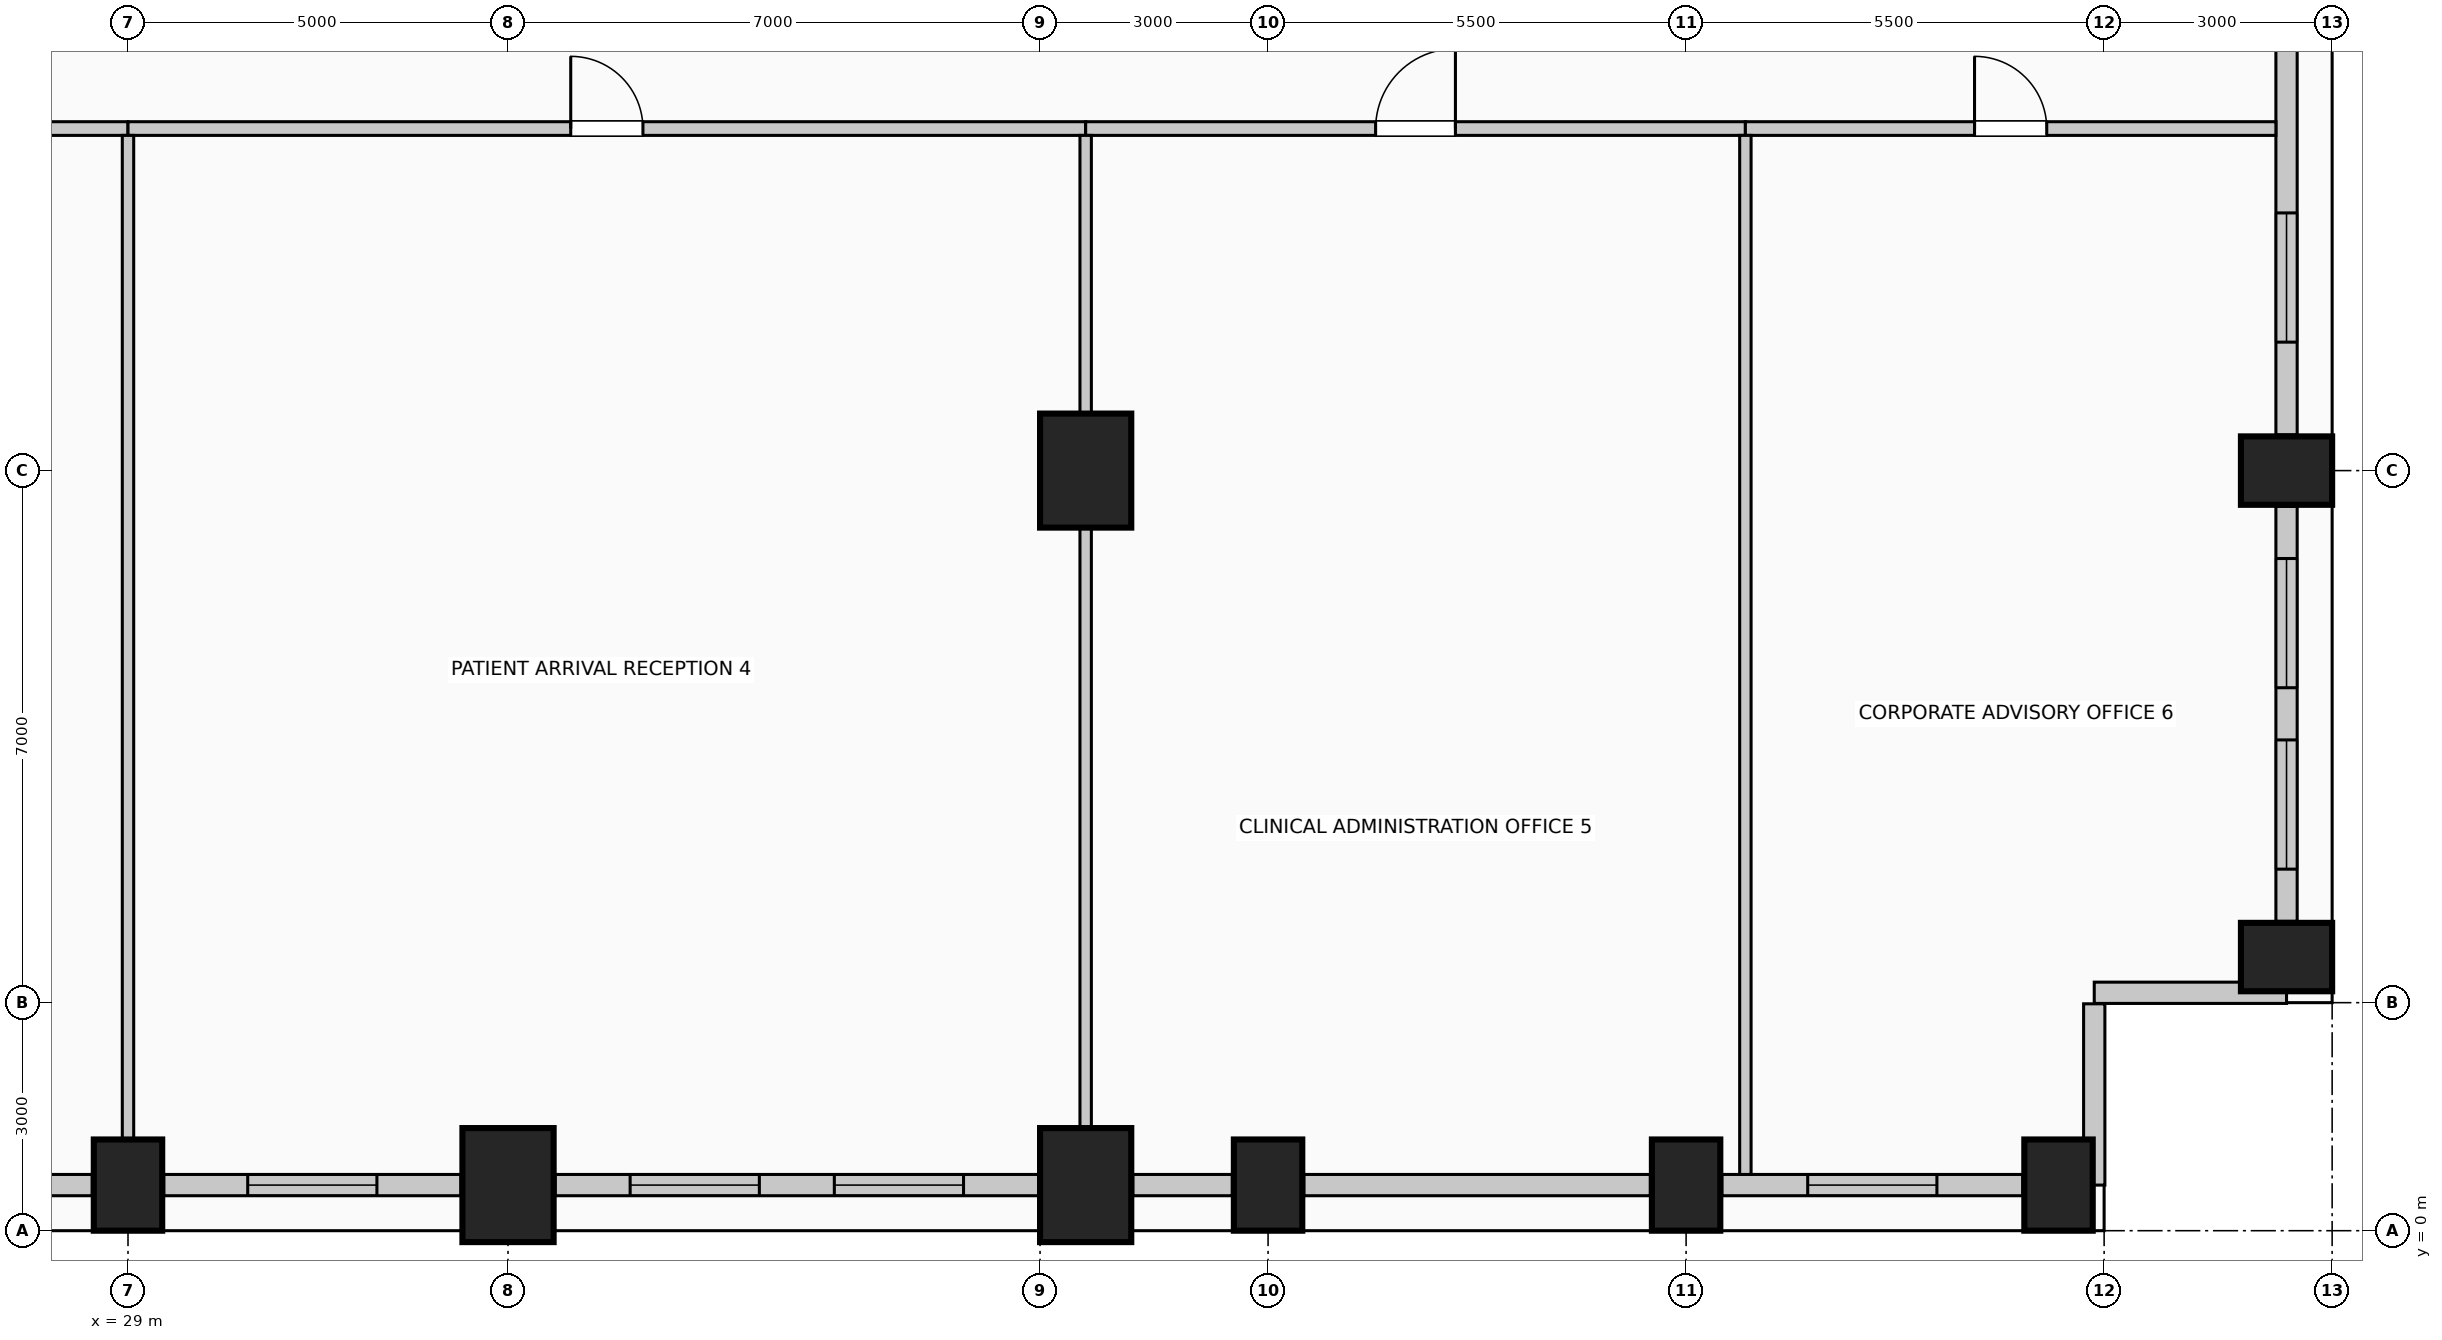
"""IFC4 building model, lengths in metres.
Left out: names, types, materials, properties, quantities, classifications, styles, units other than length and angle.
Written with IfcOpenShell. Run it as: python <this file> out.ifc"""

import sys

from ifc_helpers import new_model, si_unit, direction, frame, frame_2d, origin, origin_2d, place, context, subcontext, project, spatial, rectangle, extrude, element, fill, save


model = new_model("IFC4")
c1 = context("Model", 3, precision=1e-05, world=origin(), true_north=direction((0.0, 1.0)))
c2 = subcontext(c1, "Body", "Model", "MODEL_VIEW")
j1 = project(units=[si_unit("LENGTHUNIT", "METRE"), si_unit("PLANEANGLEUNIT", "RADIAN")], contexts=[c1])
p1 = place(None, origin())
s1 = spatial("IfcSite", under=j1, at=p1, CompositionType="ELEMENT")
p2 = place(p1, origin())
s2 = spatial("IfcBuilding", under=s1, at=p2, CompositionType="ELEMENT")
p3 = place(p2, frame((0.0, 0.0, 54.6)))
s3 = spatial("IfcBuildingStorey", under=s2, at=p3, CompositionType="ELEMENT", Elevation=54.6)
p4 = place(p3, frame((29.0, 0.6, 0.0), z_axis=(0.0, 0.0, 1.0), x_axis=(1.0, 0.0, 0.0)))
e1 = element("IfcColumn", 1, at=p4, inside=s3, PredefinedType="COLUMN", context=c2, shape_type="SweptSolid", body=[
    extrude(rectangle(XDim=0.9, YDim=1.2, at=origin_2d()), origin(), (0.0, 0.0, 1.0), 4.0),
])
for number, where, z_axis, x_axis in (
    (2, (34.0, 0.6, 0.0), (0.0, 0.0, 1.0), (1.0, 0.0, 0.0)),
    (3, (41.6, 0.6, 0.0), (0.0, 0.0, 1.0), (1.0, 0.0, 0.0)),
):
    element("IfcColumn", number, at=place(p3, frame(where, z_axis=z_axis, x_axis=x_axis)), inside=s3, PredefinedType="COLUMN", context=c2, shape_type="SweptSolid", body=[
        extrude(rectangle(XDim=1.2, YDim=1.5, at=origin_2d()), origin(), (0.0, 0.0, 1.0), 4.0),
    ])
for number, where, z_axis, x_axis in (
    (4, (44.0, 0.6, 0.0), (0.0, 0.0, 1.0), (1.0, 0.0, 0.0)),
    (5, (49.5, 0.6, 0.0), (0.0, 0.0, 1.0), (1.0, 0.0, 0.0)),
    (6, (54.4, 0.6, 0.0), (0.0, 0.0, 1.0), (1.0, 0.0, 0.0)),
    (7, (57.4, 3.6, 0.0), (0.0, 0.0, 1.0), (0.0, 1.0, 0.0)),
    (8, (57.4, 10.0, 0.0), (0.0, 0.0, 1.0), (0.0, 1.0, 0.0)),
):
    element("IfcColumn", number, at=place(p3, frame(where, z_axis=z_axis, x_axis=x_axis)), inside=s3, PredefinedType="COLUMN", context=c2, shape_type="SweptSolid", body=[
        extrude(rectangle(XDim=0.9, YDim=1.2, at=origin_2d()), origin(), (0.0, 0.0, 1.0), 4.0),
    ])
p5 = place(p3, frame((41.6, 10.0, 0.0), z_axis=(0.0, 0.0, 1.0), x_axis=(1.0, 0.0, 0.0)))
e9 = element("IfcColumn", 9, at=p5, inside=s3, PredefinedType="COLUMN", context=c2, shape_type="SweptSolid", body=[
    extrude(rectangle(XDim=1.2, YDim=1.5, at=origin_2d()), origin(), (0.0, 0.0, 1.0), 4.0),
])
p6 = place(p3, frame((28.53, 0.6, 0.0), z_axis=(0.0, 0.0, 1.0), x_axis=(-1.0, 0.0, 0.0)))
e10 = element("IfcWall", 10, at=p6, inside=s3, PredefinedType="SOLIDWALL", context=c2, shape_type="SweptSolid", body=[
    extrude(rectangle(XDim=3.91, YDim=0.28, at=frame_2d((1.955, 0.0))), origin(), (0.0, 0.0, 1.0), 2.85),
])
p7 = place(p6, frame((1.105, 0.0, 0.5)))
e11 = element("IfcOpeningElement", 11, at=p7, cuts=e10, PredefinedType="OPENING", context=c2, shape_type="SweptSolid", body=[
    extrude(rectangle(XDim=1.7, YDim=1.95, at=frame_2d((0.85, 0.975))), frame((0.0, 0.15, 0.0), z_axis=(0.0, -1.0, 0.0), x_axis=(1.0, 0.0, 0.0)), (0.0, 0.0, 1.0), 0.3),
])
p8 = place(p3, frame((33.38, 0.6, 0.0), z_axis=(0.0, 0.0, 1.0), x_axis=(-1.0, 0.0, 0.0)))
e12 = element("IfcWall", 12, at=p8, inside=s3, PredefinedType="SOLIDWALL", context=c2, shape_type="SweptSolid", body=[
    extrude(rectangle(XDim=3.91, YDim=0.28, at=frame_2d((1.955, 0.0))), origin(), (0.0, 0.0, 1.0), 2.85),
])
p9 = place(p8, frame((1.105, 0.0, 0.5)))
e13 = element("IfcOpeningElement", 13, at=p9, cuts=e12, PredefinedType="OPENING", context=c2, shape_type="SweptSolid", body=[
    extrude(rectangle(XDim=1.7, YDim=1.95, at=frame_2d((0.85, 0.975))), frame((0.0, 0.15, 0.0), z_axis=(0.0, -1.0, 0.0), x_axis=(1.0, 0.0, 0.0)), (0.0, 0.0, 1.0), 0.3),
])
p10 = place(p3, frame((40.98, 0.6, 0.0), z_axis=(0.0, 0.0, 1.0), x_axis=(-1.0, 0.0, 0.0)))
e14 = element("IfcWall", 14, at=p10, inside=s3, PredefinedType="SOLIDWALL", context=c2, shape_type="SweptSolid", body=[
    extrude(rectangle(XDim=6.36, YDim=0.28, at=frame_2d((3.18, 0.0))), origin(), (0.0, 0.0, 1.0), 2.85),
])
p11 = place(p10, frame((0.987, 0.0, 0.5)))
e15 = element("IfcOpeningElement", 15, at=p11, cuts=e14, PredefinedType="OPENING", context=c2, shape_type="SweptSolid", body=[
    extrude(rectangle(XDim=1.7, YDim=1.95, at=frame_2d((0.85, 0.975))), frame((0.0, 0.15, 0.0), z_axis=(0.0, -1.0, 0.0), x_axis=(1.0, 0.0, 0.0)), (0.0, 0.0, 1.0), 0.3),
])
p12 = place(p10, frame((3.673, 0.0, 0.5)))
e16 = element("IfcOpeningElement", 16, at=p12, cuts=e14, PredefinedType="OPENING", context=c2, shape_type="SweptSolid", body=[
    extrude(rectangle(XDim=1.7, YDim=1.95, at=frame_2d((0.85, 0.975))), frame((0.0, 0.15, 0.0), z_axis=(0.0, -1.0, 0.0), x_axis=(1.0, 0.0, 0.0)), (0.0, 0.0, 1.0), 0.3),
])
p13 = place(p3, frame((43.53, 0.6, 0.0), z_axis=(0.0, 0.0, 1.0), x_axis=(-1.0, 0.0, 0.0)))
e17 = element("IfcWall", 17, at=p13, inside=s3, PredefinedType="SOLIDWALL", context=c2, shape_type="SweptSolid", body=[
    extrude(rectangle(XDim=1.31, YDim=0.28, at=frame_2d((0.655, 0.0))), origin(), (0.0, 0.0, 1.0), 2.85),
])
p14 = place(p3, frame((49.03, 0.6, 0.0), z_axis=(0.0, 0.0, 1.0), x_axis=(-1.0, 0.0, 0.0)))
e18 = element("IfcWall", 18, at=p14, inside=s3, PredefinedType="SOLIDWALL", context=c2, shape_type="SweptSolid", body=[
    extrude(rectangle(XDim=4.56, YDim=0.28, at=frame_2d((2.28, 0.0))), origin(), (0.0, 0.0, 1.0), 2.85),
])
p15 = place(p3, frame((53.93, 0.6, 0.0), z_axis=(0.0, 0.0, 1.0), x_axis=(-1.0, 0.0, 0.0)))
e19 = element("IfcWall", 19, at=p15, inside=s3, PredefinedType="SOLIDWALL", context=c2, shape_type="SweptSolid", body=[
    extrude(rectangle(XDim=3.96, YDim=0.28, at=frame_2d((1.98, 0.0))), origin(), (0.0, 0.0, 1.0), 2.85),
])
p16 = place(p15, frame((1.13, 0.0, 0.5)))
e20 = element("IfcOpeningElement", 20, at=p16, cuts=e19, PredefinedType="OPENING", context=c2, shape_type="SweptSolid", body=[
    extrude(rectangle(XDim=1.7, YDim=1.95, at=frame_2d((0.85, 0.975))), frame((0.0, 0.15, 0.0), z_axis=(0.0, -1.0, 0.0), x_axis=(1.0, 0.0, 0.0)), (0.0, 0.0, 1.0), 0.3),
])
p17 = place(p3, frame((57.4, 9.53, 0.0), z_axis=(0.0, 0.0, 1.0), x_axis=(0.0, -1.0, 0.0)))
e21 = element("IfcWall", 21, at=p17, inside=s3, PredefinedType="SOLIDWALL", context=c2, shape_type="SweptSolid", body=[
    extrude(rectangle(XDim=5.46, YDim=0.28, at=frame_2d((2.73, 0.0))), origin(), (0.0, 0.0, 1.0), 2.85),
])
p18 = place(p17, frame((0.687, 0.0, 0.5)))
e22 = element("IfcOpeningElement", 22, at=p18, cuts=e21, PredefinedType="OPENING", context=c2, shape_type="SweptSolid", body=[
    extrude(rectangle(XDim=1.7, YDim=1.95, at=frame_2d((0.85, 0.975))), frame((0.0, 0.15, 0.0), z_axis=(0.0, -1.0, 0.0), x_axis=(1.0, 0.0, 0.0)), (0.0, 0.0, 1.0), 0.3),
])
p19 = place(p17, frame((3.073, 0.0, 0.5)))
e23 = element("IfcOpeningElement", 23, at=p19, cuts=e21, PredefinedType="OPENING", context=c2, shape_type="SweptSolid", body=[
    extrude(rectangle(XDim=1.7, YDim=1.95, at=frame_2d((0.85, 0.975))), frame((0.0, 0.15, 0.0), z_axis=(0.0, -1.0, 0.0), x_axis=(1.0, 0.0, 0.0)), (0.0, 0.0, 1.0), 0.3),
])
p20 = place(p3, frame((57.4, 17.53, 0.0), z_axis=(0.0, 0.0, 1.0), x_axis=(0.0, -1.0, 0.0)))
e24 = element("IfcWall", 24, at=p20, inside=s3, PredefinedType="SOLIDWALL", context=c2, shape_type="SweptSolid", body=[
    extrude(rectangle(XDim=7.06, YDim=0.28, at=frame_2d((3.53, 0.0))), origin(), (0.0, 0.0, 1.0), 2.85),
])
p21 = place(p20, frame((4.14, 0.0, 0.5)))
e25 = element("IfcOpeningElement", 25, at=p21, cuts=e24, PredefinedType="OPENING", context=c2, shape_type="SweptSolid", body=[
    extrude(rectangle(XDim=1.7, YDim=1.95, at=frame_2d((0.85, 0.975))), frame((0.0, 0.15, 0.0), z_axis=(0.0, -1.0, 0.0), x_axis=(1.0, 0.0, 0.0)), (0.0, 0.0, 1.0), 0.3),
])
p22 = place(p3, frame((57.4, 3.13, 0.0), z_axis=(0.0, 0.0, 1.0), x_axis=(-1.0, 0.0, 0.0)))
e26 = element("IfcWall", 26, at=p22, inside=s3, PredefinedType="SOLIDWALL", context=c2, shape_type="SweptSolid", body=[
    extrude(rectangle(XDim=2.53, YDim=0.28, at=frame_2d((1.265, 0.0))), origin(), (0.0, 0.0, 1.0), 3.7),
])
p23 = place(p3, frame((54.87, 2.985, 0.0), z_axis=(0.0, 0.0, 1.0), x_axis=(0.0, -1.0, 0.0)))
e27 = element("IfcWall", 27, at=p23, inside=s3, PredefinedType="SOLIDWALL", context=c2, shape_type="SweptSolid", body=[
    extrude(rectangle(XDim=2.385, YDim=0.28, at=frame_2d((1.192, 0.0))), origin(), (0.0, 0.0, 1.0), 3.7),
])
p24 = place(p3, frame((17.48, 14.5, 0.0), z_axis=(0.0, 0.0, 1.0), x_axis=(1.0, 0.0, 0.0)))
e28 = element("IfcWall", 28, at=p24, inside=s3, PredefinedType="PARTITIONING", context=c2, shape_type="SweptSolid", body=[
    extrude(rectangle(XDim=11.52, YDim=0.18, at=frame_2d((5.76, 0.0))), origin(), (0.0, 0.0, 1.0), 3.7),
])
p25 = place(p24, frame((5.235, 0.0, 0.0)))
e29 = element("IfcOpeningElement", 29, at=p25, cuts=e28, PredefinedType="OPENING", context=c2, shape_type="SweptSolid", body=[
    extrude(rectangle(XDim=1.05, YDim=2.15, at=frame_2d((0.525, 1.075))), frame((0.0, 0.1, 0.0), z_axis=(0.0, -1.0, 0.0), x_axis=(1.0, 0.0, 0.0)), (0.0, 0.0, 1.0), 0.2),
])
p26 = place(p3, frame((29.0, 14.5, 0.0), z_axis=(0.0, 0.0, 1.0), x_axis=(1.0, 0.0, 0.0)))
e30 = element("IfcWall", 30, at=p26, inside=s3, PredefinedType="PARTITIONING", context=c2, shape_type="SweptSolid", body=[
    extrude(rectangle(XDim=12.6, YDim=0.18, at=frame_2d((6.3, 0.0))), origin(), (0.0, 0.0, 1.0), 3.7),
])
p27 = place(p26, frame((5.825, 0.0, 0.0)))
e31 = element("IfcOpeningElement", 31, at=p27, cuts=e30, PredefinedType="OPENING", context=c2, shape_type="SweptSolid", body=[
    extrude(rectangle(XDim=0.95, YDim=2.15, at=frame_2d((0.475, 1.075))), frame((0.0, 0.1, 0.0), z_axis=(0.0, -1.0, 0.0), x_axis=(1.0, 0.0, 0.0)), (0.0, 0.0, 1.0), 0.2),
])
p28 = place(p3, frame((41.6, 14.5, 0.0), z_axis=(0.0, 0.0, 1.0), x_axis=(1.0, 0.0, 0.0)))
e32 = element("IfcWall", 32, at=p28, inside=s3, PredefinedType="PARTITIONING", context=c2, shape_type="SweptSolid", body=[
    extrude(rectangle(XDim=8.68, YDim=0.18, at=frame_2d((4.34, 0.0))), origin(), (0.0, 0.0, 1.0), 3.7),
])
p29 = place(p28, frame((3.815, 0.0, 0.0)))
e33 = element("IfcOpeningElement", 33, at=p29, cuts=e32, PredefinedType="OPENING", context=c2, shape_type="SweptSolid", body=[
    extrude(rectangle(XDim=1.05, YDim=2.15, at=frame_2d((0.525, 1.075))), frame((0.0, 0.1, 0.0), z_axis=(0.0, -1.0, 0.0), x_axis=(1.0, 0.0, 0.0)), (0.0, 0.0, 1.0), 0.2),
])
p30 = place(p3, frame((50.28, 14.5, 0.0), z_axis=(0.0, 0.0, 1.0), x_axis=(1.0, 0.0, 0.0)))
e34 = element("IfcWall", 34, at=p30, inside=s3, PredefinedType="PARTITIONING", context=c2, shape_type="SweptSolid", body=[
    extrude(rectangle(XDim=6.98, YDim=0.18, at=frame_2d((3.49, 0.0))), origin(), (0.0, 0.0, 1.0), 3.7),
])
p31 = place(p30, frame((3.015, 0.0, 0.0)))
e35 = element("IfcOpeningElement", 35, at=p31, cuts=e34, PredefinedType="OPENING", context=c2, shape_type="SweptSolid", body=[
    extrude(rectangle(XDim=0.95, YDim=2.15, at=frame_2d((0.475, 1.075))), frame((0.0, 0.1, 0.0), z_axis=(0.0, -1.0, 0.0), x_axis=(1.0, 0.0, 0.0)), (0.0, 0.0, 1.0), 0.2),
])
p32 = place(p3, frame((29.0, 1.2, 0.0), z_axis=(0.0, 0.0, 1.0), x_axis=(0.0, 1.0, 0.0)))
e36 = element("IfcWall", 36, at=p32, inside=s3, PredefinedType="PARTITIONING", context=c2, shape_type="SweptSolid", body=[
    extrude(rectangle(XDim=13.21, YDim=0.15, at=frame_2d((6.605, 0.0))), origin(), (0.0, 0.0, 1.0), 2.995),
])
p33 = place(p3, frame((41.6, 1.35, 0.0), z_axis=(0.0, 0.0, 1.0), x_axis=(0.0, 1.0, 0.0)))
e37 = element("IfcWall", 37, at=p33, inside=s3, PredefinedType="PARTITIONING", context=c2, shape_type="SweptSolid", body=[
    extrude(rectangle(XDim=7.9, YDim=0.15, at=frame_2d((3.95, 0.0))), origin(), (0.0, 0.0, 1.0), 2.995),
])
p34 = place(p3, frame((41.6, 10.75, 0.0), z_axis=(0.0, 0.0, 1.0), x_axis=(0.0, 1.0, 0.0)))
e38 = element("IfcWall", 38, at=p34, inside=s3, PredefinedType="PARTITIONING", context=c2, shape_type="SweptSolid", body=[
    extrude(rectangle(XDim=3.66, YDim=0.15, at=frame_2d((1.83, 0.0))), origin(), (0.0, 0.0, 1.0), 2.995),
])
p35 = place(p3, frame((50.28, 0.74, 0.0), z_axis=(0.0, 0.0, 1.0), x_axis=(0.0, 1.0, 0.0)))
e39 = element("IfcWall", 39, at=p35, inside=s3, PredefinedType="PARTITIONING", context=c2, shape_type="SweptSolid", body=[
    extrude(rectangle(XDim=13.67, YDim=0.15, at=frame_2d((6.835, 0.0))), origin(), (0.0, 0.0, 1.0), 3.7),
])
p36 = place(p9, origin())
e40 = element("IfcWindow", 40, at=p36, inside=s3, PartitioningType="SINGLE_PANEL", PredefinedType="WINDOW", context=c2, shape_type="SweptSolid", body=[
    extrude(rectangle(XDim=1.7, YDim=1.95, at=frame_2d((0.85, 0.975))), frame((0.0, 0.03, 0.0), z_axis=(0.0, -1.0, 0.0), x_axis=(1.0, 0.0, 0.0)), (0.0, 0.0, 1.0), 0.06),
])
fill(e13, e40)
p37 = place(p11, origin())
e41 = element("IfcWindow", 41, at=p37, inside=s3, PartitioningType="SINGLE_PANEL", PredefinedType="WINDOW", context=c2, shape_type="SweptSolid", body=[
    extrude(rectangle(XDim=1.7, YDim=1.95, at=frame_2d((0.85, 0.975))), frame((0.0, 0.03, 0.0), z_axis=(0.0, -1.0, 0.0), x_axis=(1.0, 0.0, 0.0)), (0.0, 0.0, 1.0), 0.06),
])
fill(e15, e41)
p38 = place(p12, origin())
e42 = element("IfcWindow", 42, at=p38, inside=s3, PartitioningType="SINGLE_PANEL", PredefinedType="WINDOW", context=c2, shape_type="SweptSolid", body=[
    extrude(rectangle(XDim=1.7, YDim=1.95, at=frame_2d((0.85, 0.975))), frame((0.0, 0.03, 0.0), z_axis=(0.0, -1.0, 0.0), x_axis=(1.0, 0.0, 0.0)), (0.0, 0.0, 1.0), 0.06),
])
fill(e16, e42)
p39 = place(p16, origin())
e43 = element("IfcWindow", 43, at=p39, inside=s3, PartitioningType="SINGLE_PANEL", PredefinedType="WINDOW", context=c2, shape_type="SweptSolid", body=[
    extrude(rectangle(XDim=1.7, YDim=1.95, at=frame_2d((0.85, 0.975))), frame((0.0, 0.03, 0.0), z_axis=(0.0, -1.0, 0.0), x_axis=(1.0, 0.0, 0.0)), (0.0, 0.0, 1.0), 0.06),
])
fill(e20, e43)
p40 = place(p18, origin())
e44 = element("IfcWindow", 44, at=p40, inside=s3, PartitioningType="SINGLE_PANEL", PredefinedType="WINDOW", context=c2, shape_type="SweptSolid", body=[
    extrude(rectangle(XDim=1.7, YDim=1.95, at=frame_2d((0.85, 0.975))), frame((0.0, 0.03, 0.0), z_axis=(0.0, -1.0, 0.0), x_axis=(1.0, 0.0, 0.0)), (0.0, 0.0, 1.0), 0.06),
])
fill(e22, e44)
p41 = place(p19, origin())
e45 = element("IfcWindow", 45, at=p41, inside=s3, PartitioningType="SINGLE_PANEL", PredefinedType="WINDOW", context=c2, shape_type="SweptSolid", body=[
    extrude(rectangle(XDim=1.7, YDim=1.95, at=frame_2d((0.85, 0.975))), frame((0.0, 0.03, 0.0), z_axis=(0.0, -1.0, 0.0), x_axis=(1.0, 0.0, 0.0)), (0.0, 0.0, 1.0), 0.06),
])
fill(e23, e45)
p42 = place(p21, origin())
e46 = element("IfcWindow", 46, at=p42, inside=s3, PartitioningType="SINGLE_PANEL", PredefinedType="WINDOW", context=c2, shape_type="SweptSolid", body=[
    extrude(rectangle(XDim=1.7, YDim=1.95, at=frame_2d((0.85, 0.975))), frame((0.0, 0.03, 0.0), z_axis=(0.0, -1.0, 0.0), x_axis=(1.0, 0.0, 0.0)), (0.0, 0.0, 1.0), 0.06),
])
fill(e25, e46)
p43 = place(p27, origin())
e47 = element("IfcDoor", 47, at=p43, inside=s3, OperationType="SINGLE_SWING_LEFT", PredefinedType="DOOR", context=c2, shape_type="SweptSolid", body=[
    extrude(rectangle(XDim=0.95, YDim=2.15, at=frame_2d((0.475, 1.075))), frame((0.0, 0.025, 0.0), z_axis=(0.0, -1.0, 0.0), x_axis=(1.0, 0.0, 0.0)), (0.0, 0.0, 1.0), 0.05),
])
fill(e31, e47)
p44 = place(p29, origin())
e48 = element("IfcDoor", 48, at=p44, inside=s3, OperationType="SINGLE_SWING_RIGHT", PredefinedType="DOOR", context=c2, shape_type="SweptSolid", body=[
    extrude(rectangle(XDim=1.05, YDim=2.15, at=frame_2d((0.525, 1.075))), frame((0.0, 0.025, 0.0), z_axis=(0.0, -1.0, 0.0), x_axis=(1.0, 0.0, 0.0)), (0.0, 0.0, 1.0), 0.05),
])
fill(e33, e48)
p45 = place(p31, origin())
e49 = element("IfcDoor", 49, at=p45, inside=s3, OperationType="SINGLE_SWING_LEFT", PredefinedType="DOOR", context=c2, shape_type="SweptSolid", body=[
    extrude(rectangle(XDim=0.95, YDim=2.15, at=frame_2d((0.475, 1.075))), frame((0.0, 0.025, 0.0), z_axis=(0.0, -1.0, 0.0), x_axis=(1.0, 0.0, 0.0)), (0.0, 0.0, 1.0), 0.05),
])
fill(e35, e49)
save(model, sys.argv[1])
